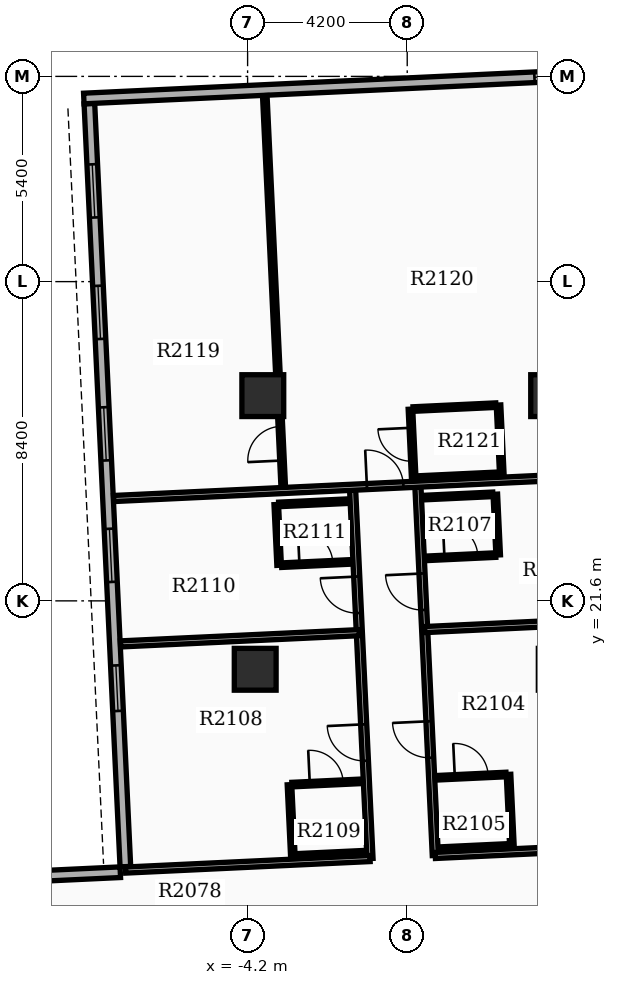
"""IFC4 building model, lengths in metres.
Left out: names, types, materials, properties, quantities, classifications, styles, units other than length and angle.
Written with IfcOpenShell. Run it as: python <this file> out.ifc"""

import sys

from ifc_helpers import new_model, si_unit, direction, frame, frame_2d, origin, origin_2d, place, context, subcontext, project, spatial, rectangle, extrude, element, fill, save


model = new_model("IFC4")
c1 = context("Model", 3, precision=1e-05, world=origin(), true_north=direction((0.0, 1.0)))
c2 = subcontext(c1, "Body", "Model", "MODEL_VIEW")
j1 = project(units=[si_unit("LENGTHUNIT", "METRE"), si_unit("PLANEANGLEUNIT", "RADIAN")], contexts=[c1])
p1 = place(None, origin())
s1 = spatial("IfcSite", under=j1, at=p1, CompositionType="ELEMENT")
p2 = place(p1, origin())
s2 = spatial("IfcBuilding", under=s1, at=p2, CompositionType="ELEMENT")
p3 = place(p2, frame((0.0, 0.0, 132.0)))
s3 = spatial("IfcBuildingStorey", under=s2, at=p3, CompositionType="ELEMENT", Elevation=132.0)
for number, where, z_axis, x_axis in (
    (1, (-4.0, 19.8, 0.0), (0.0, 0.0, 1.0), (1.0, 0.0, 0.0)),
    (2, (-3.8, 27.0, 0.0), (0.0, 0.0, 1.0), (1.0, 0.0, 0.0)),
    (3, (3.8, 27.0, 0.0), (0.0, 0.0, 1.0), (1.0, 0.0, 0.0)),
):
    element("IfcColumn", number, at=place(p3, frame(where, z_axis=z_axis, x_axis=x_axis)), inside=s3, PredefinedType="COLUMN", context=c2, shape_type="SweptSolid", body=[
        extrude(rectangle(XDim=1.1, YDim=1.1, at=origin_2d()), origin(), (0.0, 0.0, 1.0), 3.9),
    ])
p4 = place(p3, frame((-8.363, 34.685, 0.0), z_axis=(0.0, 0.0, 1.0), x_axis=(0.047103473814, -0.998890015344, 0.0)))
e4 = element("IfcWall", 4, at=p4, inside=s3, PredefinedType="STANDARD", context=c2, shape_type="SweptSolid", body=[
    extrude(rectangle(XDim=20.1, YDim=0.28, at=frame_2d((10.05, 0.0))), origin(), (0.0, 0.0, 1.0), 2.97),
])
p5 = place(p4, frame((1.6, 0.0, 0.8)))
e5 = element("IfcOpeningElement", 5, at=p5, cuts=e4, PredefinedType="OPENING", context=c2, shape_type="SweptSolid", body=[
    extrude(rectangle(XDim=1.4, YDim=1.6, at=frame_2d((0.7, 0.8))), frame((0.0, 0.15, 0.0), z_axis=(0.0, -1.0, 0.0), x_axis=(1.0, 0.0, 0.0)), (0.0, 0.0, 1.0), 0.3),
])
p6 = place(p4, frame((4.8, 0.0, 0.8)))
e6 = element("IfcOpeningElement", 6, at=p6, cuts=e4, PredefinedType="OPENING", context=c2, shape_type="SweptSolid", body=[
    extrude(rectangle(XDim=1.4, YDim=1.6, at=frame_2d((0.7, 0.8))), frame((0.0, 0.15, 0.0), z_axis=(0.0, -1.0, 0.0), x_axis=(1.0, 0.0, 0.0)), (0.0, 0.0, 1.0), 0.3),
])
p7 = place(p4, frame((8.0, 0.0, 0.8)))
e7 = element("IfcOpeningElement", 7, at=p7, cuts=e4, PredefinedType="OPENING", context=c2, shape_type="SweptSolid", body=[
    extrude(rectangle(XDim=1.4, YDim=1.6, at=frame_2d((0.7, 0.8))), frame((0.0, 0.15, 0.0), z_axis=(0.0, -1.0, 0.0), x_axis=(1.0, 0.0, 0.0)), (0.0, 0.0, 1.0), 0.3),
])
p8 = place(p4, frame((11.2, 0.0, 0.8)))
e8 = element("IfcOpeningElement", 8, at=p8, cuts=e4, PredefinedType="OPENING", context=c2, shape_type="SweptSolid", body=[
    extrude(rectangle(XDim=1.4, YDim=1.6, at=frame_2d((0.7, 0.8))), frame((0.0, 0.15, 0.0), z_axis=(0.0, -1.0, 0.0), x_axis=(1.0, 0.0, 0.0)), (0.0, 0.0, 1.0), 0.3),
])
p9 = place(p4, frame((14.799, 0.0, 0.85)))
e9 = element("IfcOpeningElement", 9, at=p9, cuts=e4, PredefinedType="OPENING", context=c2, shape_type="SweptSolid", body=[
    extrude(rectangle(XDim=1.2, YDim=1.6, at=frame_2d((0.6, 0.8))), frame((0.0, 0.15, 0.0), z_axis=(0.0, -1.0, 0.0), x_axis=(1.0, 0.0, 0.0)), (0.0, 0.0, 1.0), 0.3),
])
p10 = place(p3, frame((5.195, 35.464, 0.0), z_axis=(0.0, 0.0, 1.0), x_axis=(-0.998890092147, -0.047101845086, 0.0)))
e10 = element("IfcWall", 10, at=p10, inside=s3, PredefinedType="STANDARD", context=c2, shape_type="SweptSolid", body=[
    extrude(rectangle(XDim=13.72, YDim=0.28, at=frame_2d((6.86, 0.0))), origin(), (0.0, 0.0, 1.0), 2.97),
])
p11 = place(p10, frame((0.85, 0.0, 0.85)))
e11 = element("IfcOpeningElement", 11, at=p11, cuts=e10, PredefinedType="OPENING", context=c2, shape_type="SweptSolid", body=[
    extrude(rectangle(XDim=1.0, YDim=1.5, at=frame_2d((0.5, 0.75))), frame((0.0, 0.15, 0.0), z_axis=(0.0, -1.0, 0.0), x_axis=(1.0, 0.0, 0.0)), (0.0, 0.0, 1.0), 0.3),
])
p12 = place(p3, frame((-13.843, 14.164, 0.0), z_axis=(0.0, 0.0, 1.0), x_axis=(0.998889082162, 0.047123258997, 0.0)))
e12 = element("IfcWall", 12, at=p12, inside=s3, PredefinedType="STANDARD", context=c2, shape_type="SweptSolid", body=[
    extrude(rectangle(XDim=6.3, YDim=0.28, at=frame_2d((3.15, 0.0))), origin(), (0.0, 0.0, 1.0), 2.97),
])
p13 = place(p3, frame((0.739, 14.901, 0.0), z_axis=(0.0, 0.0, 1.0), x_axis=(-0.047116711769, 0.99888939101, 0.0)))
e13 = element("IfcWall", 13, at=p13, inside=s3, PredefinedType="PARTITIONING", context=c2, shape_type="SweptSolid", body=[
    extrude(rectangle(XDim=9.7, YDim=0.16, at=frame_2d((4.85, 0.0))), origin(), (0.0, 0.0, 1.0), 2.96),
])
p14 = place(p13, frame((2.575, 0.0, 0.0)))
e14 = element("IfcOpeningElement", 14, at=p14, cuts=e13, PredefinedType="OPENING", context=c2, shape_type="SweptSolid", body=[
    extrude(rectangle(XDim=0.96, YDim=2.15, at=frame_2d((0.48, 1.075))), frame((0.0, 0.09, 0.0), z_axis=(0.0, -1.0, 0.0), x_axis=(1.0, 0.0, 0.0)), (0.0, 0.0, 1.0), 0.18),
])
p15 = place(p13, frame((6.467, 0.0, 0.0)))
e15 = element("IfcOpeningElement", 15, at=p15, cuts=e13, PredefinedType="OPENING", context=c2, shape_type="SweptSolid", body=[
    extrude(rectangle(XDim=0.96, YDim=2.15, at=frame_2d((0.48, 1.075))), frame((0.0, 0.09, 0.0), z_axis=(0.0, -1.0, 0.0), x_axis=(1.0, 0.0, 0.0)), (0.0, 0.0, 1.0), 0.18),
])
p16 = place(p3, frame((0.739, 14.901, 0.0), z_axis=(0.0, 0.0, 1.0), x_axis=(0.998889275357, 0.047119163577, 0.0)))
e16 = element("IfcWall", 16, at=p16, inside=s3, PredefinedType="PARTITIONING", context=c2, shape_type="SweptSolid", body=[
    extrude(rectangle(XDim=5.28, YDim=0.16, at=frame_2d((2.64, 0.0))), origin(), (0.0, 0.0, 1.0), 2.96),
])
p17 = place(p3, frame((0.458, 20.845, 0.0), z_axis=(0.0, 0.0, 1.0), x_axis=(0.998890413328, 0.047095033298, 0.0)))
e17 = element("IfcWall", 17, at=p17, inside=s3, PredefinedType="PARTITIONING", context=c2, shape_type="SweptSolid", body=[
    extrude(rectangle(XDim=5.132, YDim=0.16, at=frame_2d((2.566, 0.0))), origin(), (0.0, 0.0, 1.0), 2.96),
])
p18 = place(p3, frame((0.783, 16.946, 0.0), z_axis=(0.0, 0.0, 1.0), x_axis=(0.998890786574, 0.047087116047, 0.0)))
e18 = element("IfcWall", 18, at=p18, inside=s3, PredefinedType="PARTITIONING", context=c2, shape_type="SweptSolid", body=[
    extrude(rectangle(XDim=1.82, YDim=0.12, at=frame_2d((0.91, 0.0))), origin(), (0.0, 0.0, 1.0), 2.96),
])
p19 = place(p18, frame((0.47, 0.0, 0.0)))
e19 = element("IfcOpeningElement", 19, at=p19, cuts=e18, PredefinedType="OPENING", context=c2, shape_type="SweptSolid", body=[
    extrude(rectangle(XDim=0.88, YDim=2.1, at=frame_2d((0.44, 1.05))), frame((0.0, 0.07, 0.0), z_axis=(0.0, -1.0, 0.0), x_axis=(1.0, 0.0, 0.0)), (0.0, 0.0, 1.0), 0.14),
])
p20 = place(p3, frame((0.871, 15.068, 0.0), z_axis=(0.0, 0.0, 1.0), x_axis=(0.998891083954, 0.047080807099, 0.0)))
e20 = element("IfcWall", 20, at=p20, inside=s3, PredefinedType="PARTITIONING", context=c2, shape_type="SweptSolid", body=[
    extrude(rectangle(XDim=1.82, YDim=0.12, at=frame_2d((0.91, 0.0))), origin(), (0.0, 0.0, 1.0), 2.96),
])
p21 = place(p3, frame((2.754, 15.156, 0.0), z_axis=(0.0, 0.0, 1.0), x_axis=(-0.047139425368, 0.998888319371, 0.0)))
e21 = element("IfcWall", 21, at=p21, inside=s3, PredefinedType="PARTITIONING", context=c2, shape_type="SweptSolid", body=[
    extrude(rectangle(XDim=1.88, YDim=0.12, at=frame_2d((0.94, 0.0))), origin(), (0.0, 0.0, 1.0), 2.96),
])
p22 = place(p3, frame((0.51, 22.719, 0.0), z_axis=(0.0, 0.0, 1.0), x_axis=(0.998891083954, 0.047080807099, 0.0)))
e22 = element("IfcWall", 22, at=p22, inside=s3, PredefinedType="PARTITIONING", context=c2, shape_type="SweptSolid", body=[
    extrude(rectangle(XDim=1.82, YDim=0.12, at=frame_2d((0.91, 0.0))), origin(), (0.0, 0.0, 1.0), 2.96),
])
p23 = place(p22, frame((0.47, 0.0, 0.0)))
e23 = element("IfcOpeningElement", 23, at=p23, cuts=e22, PredefinedType="OPENING", context=c2, shape_type="SweptSolid", body=[
    extrude(rectangle(XDim=0.88, YDim=2.1, at=frame_2d((0.44, 1.05))), frame((0.0, 0.07, 0.0), z_axis=(0.0, -1.0, 0.0), x_axis=(1.0, 0.0, 0.0)), (0.0, 0.0, 1.0), 0.14),
])
p24 = place(p3, frame((0.435, 24.317, 0.0), z_axis=(0.0, 0.0, 1.0), x_axis=(0.998884467853, 0.047220968666, 0.0)))
e24 = element("IfcWall", 24, at=p24, inside=s3, PredefinedType="PARTITIONING", context=c2, shape_type="SweptSolid", body=[
    extrude(rectangle(XDim=1.82, YDim=0.12, at=frame_2d((0.91, 0.0))), origin(), (0.0, 0.0, 1.0), 2.96),
])
p25 = place(p3, frame((2.393, 22.808, 0.0), z_axis=(0.0, 0.0, 1.0), x_axis=(-0.047151895633, 0.998887730798, 0.0)))
e25 = element("IfcWall", 25, at=p25, inside=s3, PredefinedType="PARTITIONING", context=c2, shape_type="SweptSolid", body=[
    extrude(rectangle(XDim=1.6, YDim=0.12, at=frame_2d((0.8, 0.0))), origin(), (0.0, 0.0, 1.0), 2.96),
])
p26 = place(p3, frame((-0.979, 14.82, 0.0), z_axis=(0.0, 0.0, 1.0), x_axis=(-0.047116711769, 0.99888939101, 0.0)))
e26 = element("IfcWall", 26, at=p26, inside=s3, PredefinedType="PARTITIONING", context=c2, shape_type="SweptSolid", body=[
    extrude(rectangle(XDim=9.7, YDim=0.16, at=frame_2d((4.85, 0.0))), origin(), (0.0, 0.0, 1.0), 2.96),
])
p27 = place(p26, frame((2.575, 0.0, 0.0)))
e27 = element("IfcOpeningElement", 27, at=p27, cuts=e26, PredefinedType="OPENING", context=c2, shape_type="SweptSolid", body=[
    extrude(rectangle(XDim=0.96, YDim=2.15, at=frame_2d((0.48, 1.075))), frame((0.0, 0.09, 0.0), z_axis=(0.0, -1.0, 0.0), x_axis=(1.0, 0.0, 0.0)), (0.0, 0.0, 1.0), 0.18),
])
p28 = place(p26, frame((6.467, 0.0, 0.0)))
e28 = element("IfcOpeningElement", 28, at=p28, cuts=e26, PredefinedType="OPENING", context=c2, shape_type="SweptSolid", body=[
    extrude(rectangle(XDim=0.96, YDim=2.15, at=frame_2d((0.48, 1.075))), frame((0.0, 0.09, 0.0), z_axis=(0.0, -1.0, 0.0), x_axis=(1.0, 0.0, 0.0)), (0.0, 0.0, 1.0), 0.18),
])
p29 = place(p3, frame((-0.979, 14.82, 0.0), z_axis=(0.0, 0.0, 1.0), x_axis=(-0.998890922349, -0.047084235666, 0.0)))
e29 = element("IfcWall", 29, at=p29, inside=s3, PredefinedType="PARTITIONING", context=c2, shape_type="SweptSolid", body=[
    extrude(rectangle(XDim=6.44, YDim=0.16, at=frame_2d((3.22, 0.0))), origin(), (0.0, 0.0, 1.0), 2.96),
])
p30 = place(p3, frame((-1.26, 20.764, 0.0), z_axis=(0.0, 0.0, 1.0), x_axis=(-0.998889891508, -0.047106099844, 0.0)))
e30 = element("IfcWall", 30, at=p30, inside=s3, PredefinedType="PARTITIONING", context=c2, shape_type="SweptSolid", body=[
    extrude(rectangle(XDim=6.292, YDim=0.16, at=frame_2d((3.146, 0.0))), origin(), (0.0, 0.0, 1.0), 2.96),
])
p31 = place(p3, frame((-3.033, 16.766, 0.0), z_axis=(0.0, 0.0, 1.0), x_axis=(0.998884766924, 0.047214641863, 0.0)))
e31 = element("IfcWall", 31, at=p31, inside=s3, PredefinedType="PARTITIONING", context=c2, shape_type="SweptSolid", body=[
    extrude(rectangle(XDim=1.82, YDim=0.12, at=frame_2d((0.91, 0.0))), origin(), (0.0, 0.0, 1.0), 2.96),
])
p32 = place(p31, frame((0.47, 0.0, 0.0)))
e32 = element("IfcOpeningElement", 32, at=p32, cuts=e31, PredefinedType="OPENING", context=c2, shape_type="SweptSolid", body=[
    extrude(rectangle(XDim=0.88, YDim=2.1, at=frame_2d((0.44, 1.05))), frame((0.0, 0.07, 0.0), z_axis=(0.0, -1.0, 0.0), x_axis=(1.0, 0.0, 0.0)), (0.0, 0.0, 1.0), 0.14),
])
p33 = place(p3, frame((-2.945, 14.888, 0.0), z_axis=(0.0, 0.0, 1.0), x_axis=(0.998884467853, 0.047220968666, 0.0)))
e33 = element("IfcWall", 33, at=p33, inside=s3, PredefinedType="PARTITIONING", context=c2, shape_type="SweptSolid", body=[
    extrude(rectangle(XDim=1.82, YDim=0.12, at=frame_2d((0.91, 0.0))), origin(), (0.0, 0.0, 1.0), 2.96),
])
p34 = place(p3, frame((-3.01, 14.885, 0.0), z_axis=(0.0, 0.0, 1.0), x_axis=(-0.047139425368, 0.998888319371, 0.0)))
e34 = element("IfcWall", 34, at=p34, inside=s3, PredefinedType="PARTITIONING", context=c2, shape_type="SweptSolid", body=[
    extrude(rectangle(XDim=1.88, YDim=0.12, at=frame_2d((0.94, 0.0))), origin(), (0.0, 0.0, 1.0), 2.96),
])
p35 = place(p3, frame((-3.305, 22.539, 0.0), z_axis=(0.0, 0.0, 1.0), x_axis=(0.998891083954, 0.047080807099, 0.0)))
e35 = element("IfcWall", 35, at=p35, inside=s3, PredefinedType="PARTITIONING", context=c2, shape_type="SweptSolid", body=[
    extrude(rectangle(XDim=1.82, YDim=0.12, at=frame_2d((0.91, 0.0))), origin(), (0.0, 0.0, 1.0), 2.96),
])
p36 = place(p35, frame((0.47, 0.0, 0.0)))
e36 = element("IfcOpeningElement", 36, at=p36, cuts=e35, PredefinedType="OPENING", context=c2, shape_type="SweptSolid", body=[
    extrude(rectangle(XDim=0.88, YDim=2.1, at=frame_2d((0.44, 1.05))), frame((0.0, 0.07, 0.0), z_axis=(0.0, -1.0, 0.0), x_axis=(1.0, 0.0, 0.0)), (0.0, 0.0, 1.0), 0.14),
])
p37 = place(p3, frame((-3.381, 24.137, 0.0), z_axis=(0.0, 0.0, 1.0), x_axis=(0.998884766924, 0.047214641863, 0.0)))
e37 = element("IfcWall", 37, at=p37, inside=s3, PredefinedType="PARTITIONING", context=c2, shape_type="SweptSolid", body=[
    extrude(rectangle(XDim=1.82, YDim=0.12, at=frame_2d((0.91, 0.0))), origin(), (0.0, 0.0, 1.0), 2.96),
])
p38 = place(p3, frame((-3.37, 22.536, 0.0), z_axis=(0.0, 0.0, 1.0), x_axis=(-0.047151895633, 0.998887730798, 0.0)))
e38 = element("IfcWall", 38, at=p38, inside=s3, PredefinedType="PARTITIONING", context=c2, shape_type="SweptSolid", body=[
    extrude(rectangle(XDim=1.6, YDim=0.12, at=frame_2d((0.8, 0.0))), origin(), (0.0, 0.0, 1.0), 2.96),
])
p39 = place(p3, frame((-7.725, 24.293, 0.0), z_axis=(0.0, 0.0, 1.0), x_axis=(0.998889967692, 0.047104484326, 0.0)))
e39 = element("IfcWall", 39, at=p39, inside=s3, PredefinedType="PARTITIONING", context=c2, shape_type="SweptSolid", body=[
    extrude(rectangle(XDim=13.144, YDim=0.16, at=frame_2d((6.572, 0.0))), origin(), (0.0, 0.0, 1.0), 2.96),
])
p40 = place(p39, frame((6.672, 0.0, 0.0)))
e40 = element("IfcOpeningElement", 40, at=p40, cuts=e39, PredefinedType="OPENING", context=c2, shape_type="SweptSolid", body=[
    extrude(rectangle(XDim=0.96, YDim=2.15, at=frame_2d((0.48, 1.075))), frame((0.0, 0.09, 0.0), z_axis=(0.0, -1.0, 0.0), x_axis=(1.0, 0.0, 0.0)), (0.0, 0.0, 1.0), 0.18),
])
p41 = place(p3, frame((-3.262, 24.594, 0.0), z_axis=(0.0, 0.0, 1.0), x_axis=(-0.047089343138, 0.998890681588, 0.0)))
e41 = element("IfcWall", 41, at=p41, inside=s3, PredefinedType="PARTITIONING", context=c2, shape_type="SweptSolid", body=[
    extrude(rectangle(XDim=10.312, YDim=0.12, at=frame_2d((5.156, 0.0))), origin(), (0.0, 0.0, 1.0), 2.96),
])
p42 = place(p41, frame((0.7, 0.0, 0.0)))
e42 = element("IfcOpeningElement", 42, at=p42, cuts=e41, PredefinedType="OPENING", context=c2, shape_type="SweptSolid", body=[
    extrude(rectangle(XDim=0.9, YDim=2.1, at=frame_2d((0.45, 1.05))), frame((0.0, 0.07, 0.0), z_axis=(0.0, -1.0, 0.0), x_axis=(1.0, 0.0, 0.0)), (0.0, 0.0, 1.0), 0.14),
])
p43 = place(p3, frame((0.171, 24.826, 0.0), z_axis=(0.0, 0.0, 1.0), x_axis=(-0.047087116047, 0.998890786574, 0.0)))
e43 = element("IfcWall", 43, at=p43, inside=s3, PredefinedType="PARTITIONING", context=c2, shape_type="SweptSolid", body=[
    extrude(rectangle(XDim=1.82, YDim=0.12, at=frame_2d((0.91, 0.0))), origin(), (0.0, 0.0, 1.0), 2.96),
])
p44 = place(p43, frame((0.45, 0.0, 0.0)))
e44 = element("IfcOpeningElement", 44, at=p44, cuts=e43, PredefinedType="OPENING", context=c2, shape_type="SweptSolid", body=[
    extrude(rectangle(XDim=0.88, YDim=2.1, at=frame_2d((0.44, 1.05))), frame((0.0, 0.07, 0.0), z_axis=(0.0, -1.0, 0.0), x_axis=(1.0, 0.0, 0.0)), (0.0, 0.0, 1.0), 0.14),
])
p45 = place(p3, frame((2.488, 24.935, 0.0), z_axis=(0.0, 0.0, 1.0), x_axis=(-0.047214641863, 0.998884766924, 0.0)))
e45 = element("IfcWall", 45, at=p45, inside=s3, PredefinedType="PARTITIONING", context=c2, shape_type="SweptSolid", body=[
    extrude(rectangle(XDim=1.82, YDim=0.12, at=frame_2d((0.91, 0.0))), origin(), (0.0, 0.0, 1.0), 2.96),
])
p46 = place(p3, frame((0.241, 24.829, 0.0), z_axis=(0.0, 0.0, 1.0), x_axis=(0.998887815408, 0.047150103183, 0.0)))
e46 = element("IfcWall", 46, at=p46, inside=s3, PredefinedType="PARTITIONING", context=c2, shape_type="SweptSolid", body=[
    extrude(rectangle(XDim=2.18, YDim=0.12, at=frame_2d((1.09, 0.0))), origin(), (0.0, 0.0, 1.0), 2.96),
])
p47 = place(p3, frame((0.155, 26.647, 0.0), z_axis=(0.0, 0.0, 1.0), x_axis=(0.998893331673, 0.047033094092, 0.0)))
e47 = element("IfcWall", 47, at=p47, inside=s3, PredefinedType="PARTITIONING", context=c2, shape_type="SweptSolid", body=[
    extrude(rectangle(XDim=2.18, YDim=0.12, at=frame_2d((1.09, 0.0))), origin(), (0.0, 0.0, 1.0), 2.96),
])
p48 = place(p5, origin())
e48 = element("IfcWindow", 48, at=p48, inside=s3, PartitioningType="SINGLE_PANEL", PredefinedType="WINDOW", context=c2, shape_type="SweptSolid", body=[
    extrude(rectangle(XDim=1.4, YDim=1.6, at=frame_2d((0.7, 0.8))), frame((0.0, 0.03, 0.0), z_axis=(0.0, -1.0, 0.0), x_axis=(1.0, 0.0, 0.0)), (0.0, 0.0, 1.0), 0.06),
])
fill(e5, e48)
p49 = place(p6, origin())
e49 = element("IfcWindow", 49, at=p49, inside=s3, PartitioningType="SINGLE_PANEL", PredefinedType="WINDOW", context=c2, shape_type="SweptSolid", body=[
    extrude(rectangle(XDim=1.4, YDim=1.6, at=frame_2d((0.7, 0.8))), frame((0.0, 0.03, 0.0), z_axis=(0.0, -1.0, 0.0), x_axis=(1.0, 0.0, 0.0)), (0.0, 0.0, 1.0), 0.06),
])
fill(e6, e49)
p50 = place(p7, origin())
e50 = element("IfcWindow", 50, at=p50, inside=s3, PartitioningType="SINGLE_PANEL", PredefinedType="WINDOW", context=c2, shape_type="SweptSolid", body=[
    extrude(rectangle(XDim=1.4, YDim=1.6, at=frame_2d((0.7, 0.8))), frame((0.0, 0.03, 0.0), z_axis=(0.0, -1.0, 0.0), x_axis=(1.0, 0.0, 0.0)), (0.0, 0.0, 1.0), 0.06),
])
fill(e7, e50)
p51 = place(p8, origin())
e51 = element("IfcWindow", 51, at=p51, inside=s3, PartitioningType="SINGLE_PANEL", PredefinedType="WINDOW", context=c2, shape_type="SweptSolid", body=[
    extrude(rectangle(XDim=1.4, YDim=1.6, at=frame_2d((0.7, 0.8))), frame((0.0, 0.03, 0.0), z_axis=(0.0, -1.0, 0.0), x_axis=(1.0, 0.0, 0.0)), (0.0, 0.0, 1.0), 0.06),
])
fill(e8, e51)
p52 = place(p11, origin())
e52 = element("IfcWindow", 52, at=p52, inside=s3, PartitioningType="SINGLE_PANEL", PredefinedType="WINDOW", context=c2, shape_type="SweptSolid", body=[
    extrude(rectangle(XDim=1.0, YDim=1.5, at=frame_2d((0.5, 0.75))), frame((0.0, 0.03, 0.0), z_axis=(0.0, -1.0, 0.0), x_axis=(1.0, 0.0, 0.0)), (0.0, 0.0, 1.0), 0.06),
])
fill(e11, e52)
p53 = place(p9, origin())
e53 = element("IfcWindow", 53, at=p53, inside=s3, PartitioningType="SINGLE_PANEL", PredefinedType="WINDOW", context=c2, shape_type="SweptSolid", body=[
    extrude(rectangle(XDim=1.2, YDim=1.6, at=frame_2d((0.6, 0.8))), frame((0.0, 0.03, 0.0), z_axis=(0.0, -1.0, 0.0), x_axis=(1.0, 0.0, 0.0)), (0.0, 0.0, 1.0), 0.06),
])
fill(e9, e53)
p54 = place(p14, origin())
e54 = element("IfcDoor", 54, at=p54, inside=s3, OperationType="SINGLE_SWING_RIGHT", PredefinedType="DOOR", context=c2, shape_type="SweptSolid", body=[
    extrude(rectangle(XDim=0.96, YDim=2.15, at=frame_2d((0.48, 1.075))), frame((0.0, 0.025, 0.0), z_axis=(0.0, -1.0, 0.0), x_axis=(1.0, 0.0, 0.0)), (0.0, 0.0, 1.0), 0.05),
])
fill(e14, e54)
p55 = place(p19, origin())
e55 = element("IfcDoor", 55, at=p55, inside=s3, OperationType="SINGLE_SWING_LEFT", PredefinedType="DOOR", context=c2, shape_type="SweptSolid", body=[
    extrude(rectangle(XDim=0.88, YDim=2.1, at=frame_2d((0.44, 1.05))), frame((0.0, 0.025, 0.0), z_axis=(0.0, -1.0, 0.0), x_axis=(1.0, 0.0, 0.0)), (0.0, 0.0, 1.0), 0.05),
])
fill(e19, e55)
p56 = place(p15, origin())
e56 = element("IfcDoor", 56, at=p56, inside=s3, OperationType="SINGLE_SWING_RIGHT", PredefinedType="DOOR", context=c2, shape_type="SweptSolid", body=[
    extrude(rectangle(XDim=0.96, YDim=2.15, at=frame_2d((0.48, 1.075))), frame((0.0, 0.025, 0.0), z_axis=(0.0, -1.0, 0.0), x_axis=(1.0, 0.0, 0.0)), (0.0, 0.0, 1.0), 0.05),
])
fill(e15, e56)
p57 = place(p23, origin())
e57 = element("IfcDoor", 57, at=p57, inside=s3, OperationType="SINGLE_SWING_LEFT", PredefinedType="DOOR", context=c2, shape_type="SweptSolid", body=[
    extrude(rectangle(XDim=0.88, YDim=2.1, at=frame_2d((0.44, 1.05))), frame((0.0, 0.025, 0.0), z_axis=(0.0, -1.0, 0.0), x_axis=(1.0, 0.0, 0.0)), (0.0, 0.0, 1.0), 0.05),
])
fill(e23, e57)
p58 = place(p27, origin())
e58 = element("IfcDoor", 58, at=p58, inside=s3, OperationType="SINGLE_SWING_RIGHT", PredefinedType="DOOR", context=c2, shape_type="SweptSolid", body=[
    extrude(rectangle(XDim=0.96, YDim=2.15, at=frame_2d((0.48, 1.075))), frame((0.0, 0.025, 0.0), z_axis=(0.0, -1.0, 0.0), x_axis=(1.0, 0.0, 0.0)), (0.0, 0.0, 1.0), 0.05),
])
fill(e27, e58)
p59 = place(p32, origin())
e59 = element("IfcDoor", 59, at=p59, inside=s3, OperationType="SINGLE_SWING_LEFT", PredefinedType="DOOR", context=c2, shape_type="SweptSolid", body=[
    extrude(rectangle(XDim=0.88, YDim=2.1, at=frame_2d((0.44, 1.05))), frame((0.0, 0.025, 0.0), z_axis=(0.0, -1.0, 0.0), x_axis=(1.0, 0.0, 0.0)), (0.0, 0.0, 1.0), 0.05),
])
fill(e32, e59)
p60 = place(p28, origin())
e60 = element("IfcDoor", 60, at=p60, inside=s3, OperationType="SINGLE_SWING_RIGHT", PredefinedType="DOOR", context=c2, shape_type="SweptSolid", body=[
    extrude(rectangle(XDim=0.96, YDim=2.15, at=frame_2d((0.48, 1.075))), frame((0.0, 0.025, 0.0), z_axis=(0.0, -1.0, 0.0), x_axis=(1.0, 0.0, 0.0)), (0.0, 0.0, 1.0), 0.05),
])
fill(e28, e60)
p61 = place(p36, origin())
e61 = element("IfcDoor", 61, at=p61, inside=s3, OperationType="SINGLE_SWING_LEFT", PredefinedType="DOOR", context=c2, shape_type="SweptSolid", body=[
    extrude(rectangle(XDim=0.88, YDim=2.1, at=frame_2d((0.44, 1.05))), frame((0.0, 0.025, 0.0), z_axis=(0.0, -1.0, 0.0), x_axis=(1.0, 0.0, 0.0)), (0.0, 0.0, 1.0), 0.05),
])
fill(e36, e61)
p62 = place(p40, origin())
e62 = element("IfcDoor", 62, at=p62, inside=s3, OperationType="SINGLE_SWING_LEFT", PredefinedType="DOOR", context=c2, shape_type="SweptSolid", body=[
    extrude(rectangle(XDim=0.96, YDim=2.15, at=frame_2d((0.48, 1.075))), frame((0.0, 0.025, 0.0), z_axis=(0.0, -1.0, 0.0), x_axis=(1.0, 0.0, 0.0)), (0.0, 0.0, 1.0), 0.05),
])
fill(e40, e62)
p63 = place(p42, origin())
e63 = element("IfcDoor", 63, at=p63, inside=s3, OperationType="SINGLE_SWING_LEFT", PredefinedType="DOOR", context=c2, shape_type="SweptSolid", body=[
    extrude(rectangle(XDim=0.9, YDim=2.1, at=frame_2d((0.45, 1.05))), frame((0.0, 0.025, 0.0), z_axis=(0.0, -1.0, 0.0), x_axis=(1.0, 0.0, 0.0)), (0.0, 0.0, 1.0), 0.05),
])
fill(e42, e63)
p64 = place(p44, origin())
e64 = element("IfcDoor", 64, at=p64, inside=s3, OperationType="SINGLE_SWING_RIGHT", PredefinedType="DOOR", context=c2, shape_type="SweptSolid", body=[
    extrude(rectangle(XDim=0.88, YDim=2.1, at=frame_2d((0.44, 1.05))), frame((0.0, 0.025, 0.0), z_axis=(0.0, -1.0, 0.0), x_axis=(1.0, 0.0, 0.0)), (0.0, 0.0, 1.0), 0.05),
])
fill(e44, e64)
save(model, sys.argv[1])
